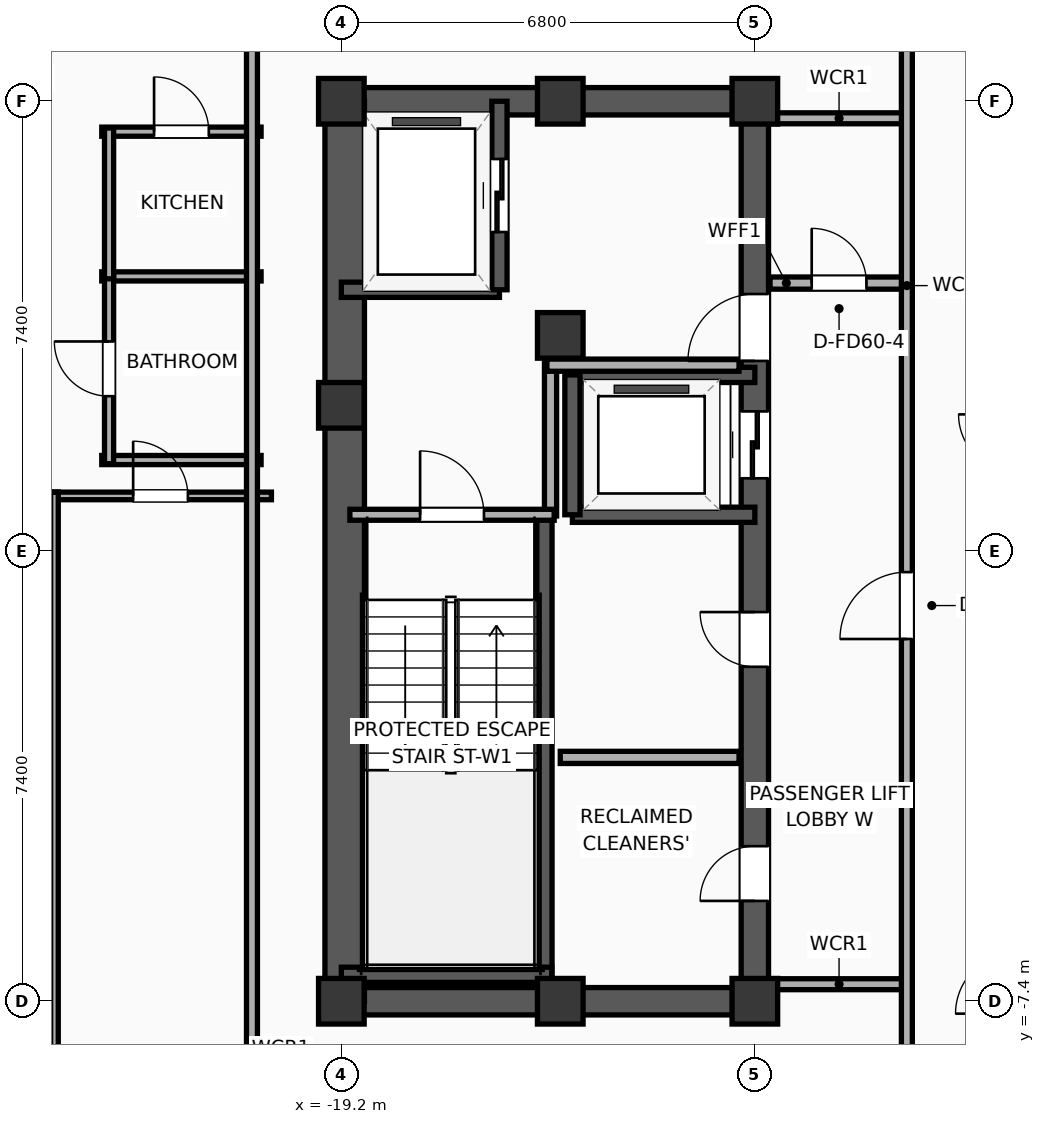
"""IFC4 building model, lengths in metres.
Left out: names, types, materials, properties, quantities, classifications, styles, units other than length and angle.
Written with IfcOpenShell. Run it as: python <this file> out.ifc"""

import sys

from ifc_helpers import new_model, si_unit, direction, frame, frame_2d, origin, origin_2d, place, context, subcontext, project, spatial, rectangle, extrude, element, fill, save


model = new_model("IFC4")
c1 = context("Model", 3, precision=1e-05, world=origin(), true_north=direction((0.0, 1.0)))
c2 = subcontext(c1, "Body", "Model", "MODEL_VIEW")
j1 = project(units=[si_unit("LENGTHUNIT", "METRE"), si_unit("PLANEANGLEUNIT", "RADIAN")], contexts=[c1])
p1 = place(None, origin())
s1 = spatial("IfcSite", under=j1, at=p1, CompositionType="ELEMENT")
p2 = place(p1, origin())
s2 = spatial("IfcBuilding", under=s1, at=p2, CompositionType="ELEMENT")
p3 = place(p2, frame((0.0, 0.0, 302.9)))
s3 = spatial("IfcBuildingStorey", under=s2, at=p3, CompositionType="ELEMENT", Elevation=302.9)
for number, where, z_axis, x_axis in (
    (1, (-19.2, -7.4, 0.0), (0.0, 0.0, 1.0), (1.0, 0.0, 0.0)),
    (2, (-19.2, 2.4, 0.0), (0.0, 0.0, 1.0), (1.0, 0.0, 0.0)),
    (3, (-19.2, 7.4, 0.0), (0.0, 0.0, 1.0), (1.0, 0.0, 0.0)),
    (4, (-15.6, -7.4, 0.0), (0.0, 0.0, 1.0), (1.0, 0.0, 0.0)),
    (5, (-15.6, 7.4, 0.0), (0.0, 0.0, 1.0), (1.0, 0.0, 0.0)),
    (6, (-12.4, -7.4, 0.0), (0.0, 0.0, 1.0), (1.0, 0.0, 0.0)),
    (7, (-15.6, 3.55, 0.0), (0.0, 0.0, 1.0), (1.0, 0.0, 0.0)),
    (8, (-12.4, 7.4, 0.0), (0.0, 0.0, 1.0), (1.0, 0.0, 0.0)),
):
    element("IfcColumn", number, at=place(p3, frame(where, z_axis=z_axis, x_axis=x_axis)), inside=s3, PredefinedType="COLUMN", context=c2, shape_type="SweptSolid", body=[
        extrude(rectangle(XDim=0.75, YDim=0.75, at=origin_2d()), origin(), (0.0, 0.0, 1.0), 3.9),
    ])
for number, where, z_axis, x_axis in (
    (9, (-19.425, -7.4, 0.0), (0.0, 0.0, 1.0), (1.0, 0.0, 0.0)),
    (10, (-19.425, 7.4, 0.0), (0.0, 0.0, 1.0), (1.0, 0.0, 0.0)),
):
    element("IfcWall", number, at=place(p3, frame(where, z_axis=z_axis, x_axis=x_axis)), inside=s3, PredefinedType="SHEAR", context=c2, shape_type="SweptSolid", body=[
        extrude(rectangle(XDim=7.25, YDim=0.45, at=frame_2d((3.625, 0.0))), origin(), (0.0, 0.0, 1.0), 3.635),
    ])
p4 = place(p3, frame((-19.145, -7.4, 0.0), z_axis=(0.0, 0.0, 1.0), x_axis=(0.0, 1.0, 0.0)))
e11 = element("IfcWall", 11, at=p4, inside=s3, PredefinedType="SHEAR", context=c2, shape_type="SweptSolid", body=[
    extrude(rectangle(XDim=14.8, YDim=0.65, at=frame_2d((7.4, 0.0))), origin(), (0.0, 0.0, 1.0), 3.635),
])
p5 = place(p3, frame((-12.4, -7.4, 0.0), z_axis=(0.0, 0.0, 1.0), x_axis=(0.0, 1.0, 0.0)))
e12 = element("IfcWall", 12, at=p5, inside=s3, PredefinedType="SHEAR", context=c2, shape_type="SweptSolid", body=[
    extrude(rectangle(XDim=14.8, YDim=0.45, at=frame_2d((7.4, 0.0))), origin(), (0.0, 0.0, 1.0), 3.635),
])
p6 = place(p5, frame((8.6, 0.0, 0.0)))
e13 = element("IfcOpeningElement", 13, at=p6, cuts=e12, PredefinedType="OPENING", context=c2, shape_type="SweptSolid", body=[
    extrude(rectangle(XDim=1.1, YDim=2.05, at=frame_2d((0.55, 1.025))), frame((0.0, 0.235, 0.0), z_axis=(0.0, -1.0, 0.0), x_axis=(1.0, 0.0, 0.0)), (0.0, 0.0, 1.0), 0.47),
])
p7 = place(p5, frame((10.53, 0.0, 0.0)))
e14 = element("IfcOpeningElement", 14, at=p7, cuts=e12, PredefinedType="OPENING", context=c2, shape_type="SweptSolid", body=[
    extrude(rectangle(XDim=1.1, YDim=2.05, at=frame_2d((0.55, 1.025))), frame((0.0, 0.235, 0.0), z_axis=(0.0, -1.0, 0.0), x_axis=(1.0, 0.0, 0.0)), (0.0, 0.0, 1.0), 0.47),
])
p8 = place(p5, frame((1.65, 0.0, 0.0)))
e15 = element("IfcOpeningElement", 15, at=p8, cuts=e12, PredefinedType="OPENING", context=c2, shape_type="SweptSolid", body=[
    extrude(rectangle(XDim=0.9, YDim=2.05, at=frame_2d((0.45, 1.025))), frame((0.0, 0.235, 0.0), z_axis=(0.0, -1.0, 0.0), x_axis=(1.0, 0.0, 0.0)), (0.0, 0.0, 1.0), 0.47),
])
p9 = place(p5, frame((5.5, 0.0, 0.0)))
e16 = element("IfcOpeningElement", 16, at=p9, cuts=e12, PredefinedType="OPENING", context=c2, shape_type="SweptSolid", body=[
    extrude(rectangle(XDim=0.9, YDim=2.05, at=frame_2d((0.45, 1.025))), frame((0.0, 0.235, 0.0), z_axis=(0.0, -1.0, 0.0), x_axis=(1.0, 0.0, 0.0)), (0.0, 0.0, 1.0), 0.47),
])
p10 = place(p3, frame((-15.86, -7.085, 0.0), z_axis=(0.0, 0.0, 1.0), x_axis=(0.0, 1.0, 0.0)))
e17 = element("IfcWall", 17, at=p10, inside=s3, PredefinedType="SOLIDWALL", context=c2, shape_type="SweptSolid", body=[
    extrude(rectangle(XDim=7.685, YDim=0.25, at=frame_2d((3.843, 0.0))), origin(), (0.0, 0.0, 1.0), 3.635),
])
p11 = place(p3, frame((-19.2, -6.965, 0.0), z_axis=(0.0, 0.0, 1.0), x_axis=(1.0, 0.0, 0.0)))
e18 = element("IfcWall", 18, at=p11, inside=s3, PredefinedType="SOLIDWALL", context=c2, shape_type="SweptSolid", body=[
    extrude(rectangle(XDim=3.46, YDim=0.25, at=frame_2d((1.73, 0.0))), origin(), (0.0, 0.0, 1.0), 3.635),
])
p12 = place(p3, frame((-19.2, 4.3, 0.0), z_axis=(0.0, 0.0, 1.0), x_axis=(1.0, 0.0, 0.0)))
e19 = element("IfcWall", 19, at=p12, inside=s3, PredefinedType="SOLIDWALL", context=c2, shape_type="SweptSolid", body=[
    extrude(rectangle(XDim=2.6, YDim=0.25, at=frame_2d((1.3, 0.0))), origin(), (0.0, 0.0, 1.0), 3.635),
])
p13 = place(p3, frame((-16.6, 4.3, 0.0), z_axis=(0.0, 0.0, 1.0), x_axis=(0.0, 1.0, 0.0)))
e20 = element("IfcWall", 20, at=p13, inside=s3, PredefinedType="SOLIDWALL", context=c2, shape_type="SweptSolid", body=[
    extrude(rectangle(XDim=3.1, YDim=0.25, at=frame_2d((1.55, 0.0))), origin(), (0.0, 0.0, 1.0), 3.635),
])
p14 = place(p13, frame((0.95, 0.0, 0.0)))
e21 = element("IfcOpeningElement", 21, at=p14, cuts=e20, PredefinedType="OPENING", context=c2, shape_type="SweptSolid", body=[
    extrude(rectangle(XDim=1.2, YDim=2.05, at=frame_2d((0.6, 1.025))), frame((0.0, 0.135, 0.0), z_axis=(0.0, -1.0, 0.0), x_axis=(1.0, 0.0, 0.0)), (0.0, 0.0, 1.0), 0.27),
])
for number, where, z_axis, x_axis in (
    (22, (-15.4, 0.6, 0.0), (0.0, 0.0, 1.0), (1.0, 0.0, 0.0)),
    (23, (-12.4, 2.9, 0.0), (0.0, 0.0, 1.0), (-1.0, 0.0, 0.0)),
):
    element("IfcWall", number, at=place(p3, frame(where, z_axis=z_axis, x_axis=x_axis)), inside=s3, PredefinedType="SOLIDWALL", context=c2, shape_type="SweptSolid", body=[
        extrude(rectangle(XDim=3.0, YDim=0.25, at=frame_2d((1.5, 0.0))), origin(), (0.0, 0.0, 1.0), 3.635),
    ])
p15 = place(p3, frame((-15.4, 2.9, 0.0), z_axis=(0.0, 0.0, 1.0), x_axis=(0.0, -1.0, 0.0)))
e24 = element("IfcWall", 24, at=p15, inside=s3, PredefinedType="SOLIDWALL", context=c2, shape_type="SweptSolid", body=[
    extrude(rectangle(XDim=2.3, YDim=0.25, at=frame_2d((1.15, 0.0))), origin(), (0.0, 0.0, 1.0), 3.635),
])
p16 = place(p3, frame((-15.76, 0.58, 0.0), z_axis=(0.0, 0.0, 1.0), x_axis=(0.0, 1.0, 0.0)))
e25 = element("IfcWall", 25, at=p16, inside=s3, PredefinedType="PARTITIONING", context=c2, shape_type="SweptSolid", body=[
    extrude(rectangle(XDim=2.52, YDim=0.2, at=frame_2d((1.26, 0.0))), origin(), (0.0, 0.0, 1.0), 3.635),
])
p17 = place(p3, frame((-15.82, 3.06, 0.0), z_axis=(0.0, 0.0, 1.0), x_axis=(1.0, 0.0, 0.0)))
e26 = element("IfcWall", 26, at=p17, inside=s3, PredefinedType="PARTITIONING", context=c2, shape_type="SweptSolid", body=[
    extrude(rectangle(XDim=3.16, YDim=0.2, at=frame_2d((1.58, 0.0))), origin(), (0.0, 0.0, 1.0), 3.635),
])
p18 = place(p3, frame((-19.06, 0.6, 0.0), z_axis=(0.0, 0.0, 1.0), x_axis=(1.0, 0.0, 0.0)))
e27 = element("IfcWall", 27, at=p18, inside=s3, PredefinedType="PARTITIONING", context=c2, shape_type="SweptSolid", body=[
    extrude(rectangle(XDim=3.36, YDim=0.18, at=frame_2d((1.68, 0.0))), origin(), (0.0, 0.0, 1.0), 3.635),
])
p19 = place(p18, frame((1.155, 0.0, 0.0)))
e28 = element("IfcOpeningElement", 28, at=p19, cuts=e27, PredefinedType="OPENING", context=c2, shape_type="SweptSolid", body=[
    extrude(rectangle(XDim=1.05, YDim=2.05, at=frame_2d((0.525, 1.025))), frame((0.0, 0.1, 0.0), z_axis=(0.0, -1.0, 0.0), x_axis=(1.0, 0.0, 0.0)), (0.0, 0.0, 1.0), 0.2),
])
p20 = place(p3, frame((-15.6, -3.39, 0.0), z_axis=(0.0, 0.0, 1.0), x_axis=(1.0, 0.0, 0.0)))
e29 = element("IfcWall", 29, at=p20, inside=s3, PredefinedType="PARTITIONING", context=c2, shape_type="SweptSolid", body=[
    extrude(rectangle(XDim=2.94, YDim=0.2, at=frame_2d((1.47, 0.0))), origin(), (0.0, 0.0, 1.0), 3.635),
])
p21 = place(p3, frame((-12.15, 4.41, 0.0), z_axis=(0.0, 0.0, 1.0), x_axis=(1.0, 0.0, 0.0)))
e30 = element("IfcWall", 30, at=p21, inside=s3, PredefinedType="PARTITIONING", context=c2, shape_type="SweptSolid", body=[
    extrude(rectangle(XDim=2.27, YDim=0.2, at=frame_2d((1.135, 0.0))), origin(), (0.0, 0.0, 1.0), 3.635),
])
p22 = place(p21, frame((0.685, 0.0, 0.0)))
e31 = element("IfcOpeningElement", 31, at=p22, cuts=e30, PredefinedType="OPENING", context=c2, shape_type="SweptSolid", body=[
    extrude(rectangle(XDim=0.9, YDim=2.05, at=frame_2d((0.45, 1.025))), frame((0.0, 0.11, 0.0), z_axis=(0.0, -1.0, 0.0), x_axis=(1.0, 0.0, 0.0)), (0.0, 0.0, 1.0), 0.22),
])
for number, where, z_axis, x_axis in (
    (32, (-12.15, 7.12, 0.0), (0.0, 0.0, 1.0), (1.0, 0.0, 0.0)),
    (33, (-12.15, -7.12, 0.0), (0.0, 0.0, 1.0), (1.0, 0.0, 0.0)),
):
    element("IfcWall", number, at=place(p3, frame(where, z_axis=z_axis, x_axis=x_axis)), inside=s3, PredefinedType="PARTITIONING", context=c2, shape_type="SweptSolid", body=[
        extrude(rectangle(XDim=2.27, YDim=0.18, at=frame_2d((1.135, 0.0))), origin(), (0.0, 0.0, 1.0), 3.635),
    ])
p23 = place(p3, frame((-9.9, -8.93, 0.0), z_axis=(0.0, 0.0, 1.0), x_axis=(0.0, 1.0, 0.0)))
e34 = element("IfcWall", 34, at=p23, inside=s3, PredefinedType="PARTITIONING", context=c2, shape_type="SweptSolid", body=[
    extrude(rectangle(XDim=17.86, YDim=0.18, at=frame_2d((8.93, 0.0))), origin(), (0.0, 0.0, 1.0), 3.635),
])
p24 = place(p23, frame((7.487, 0.0, 0.0)))
e35 = element("IfcOpeningElement", 35, at=p24, cuts=e34, PredefinedType="OPENING", context=c2, shape_type="SweptSolid", body=[
    extrude(rectangle(XDim=1.1, YDim=2.05, at=frame_2d((0.55, 1.025))), frame((0.0, 0.1, 0.0), z_axis=(0.0, -1.0, 0.0), x_axis=(1.0, 0.0, 0.0)), (0.0, 0.0, 1.0), 0.2),
])
p25 = place(p3, frame((-23.14, 6.9, 0.0), z_axis=(0.0, 0.0, 1.0), x_axis=(1.0, 0.0, 0.0)))
e36 = element("IfcWall", 36, at=p25, inside=s3, PredefinedType="PLUMBINGWALL", context=c2, shape_type="SweptSolid", body=[
    extrude(rectangle(XDim=2.62, YDim=0.15, at=frame_2d((1.31, 0.0))), origin(), (0.0, 0.0, 1.0), 3.635),
])
p26 = place(p25, frame((0.86, 0.0, 0.0)))
e37 = element("IfcOpeningElement", 37, at=p26, cuts=e36, PredefinedType="OPENING", context=c2, shape_type="SweptSolid", body=[
    extrude(rectangle(XDim=0.9, YDim=2.05, at=frame_2d((0.45, 1.025))), frame((0.0, 0.085, 0.0), z_axis=(0.0, -1.0, 0.0), x_axis=(1.0, 0.0, 0.0)), (0.0, 0.0, 1.0), 0.17),
])
for number, where, z_axis, x_axis in (
    (38, (-23.14, 4.52, 0.0), (0.0, 0.0, 1.0), (1.0, 0.0, 0.0)),
    (39, (-23.14, 1.5, 0.0), (0.0, 0.0, 1.0), (1.0, 0.0, 0.0)),
):
    element("IfcWall", number, at=place(p3, frame(where, z_axis=z_axis, x_axis=x_axis)), inside=s3, PredefinedType="PLUMBINGWALL", context=c2, shape_type="SweptSolid", body=[
        extrude(rectangle(XDim=2.62, YDim=0.15, at=frame_2d((1.31, 0.0))), origin(), (0.0, 0.0, 1.0), 3.635),
    ])
p27 = place(p3, frame((-23.02, 1.44, 0.0), z_axis=(0.0, 0.0, 1.0), x_axis=(0.0, 1.0, 0.0)))
e40 = element("IfcWall", 40, at=p27, inside=s3, PredefinedType="PLUMBINGWALL", context=c2, shape_type="SweptSolid", body=[
    extrude(rectangle(XDim=3.12, YDim=0.15, at=frame_2d((1.56, 0.0))), origin(), (0.0, 0.0, 1.0), 3.635),
])
p28 = place(p27, frame((1.11, 0.0, 0.0)))
e41 = element("IfcOpeningElement", 41, at=p28, cuts=e40, PredefinedType="OPENING", context=c2, shape_type="SweptSolid", body=[
    extrude(rectangle(XDim=0.9, YDim=2.05, at=frame_2d((0.45, 1.025))), frame((0.0, 0.085, 0.0), z_axis=(0.0, -1.0, 0.0), x_axis=(1.0, 0.0, 0.0)), (0.0, 0.0, 1.0), 0.17),
])
p29 = place(p3, frame((-23.02, 4.48, 0.0), z_axis=(0.0, 0.0, 1.0), x_axis=(0.0, 1.0, 0.0)))
e42 = element("IfcWall", 42, at=p29, inside=s3, PredefinedType="PLUMBINGWALL", context=c2, shape_type="SweptSolid", body=[
    extrude(rectangle(XDim=2.48, YDim=0.15, at=frame_2d((1.24, 0.0))), origin(), (0.0, 0.0, 1.0), 3.635),
])
p30 = place(p3, frame((-27.229, 0.91, 0.0), z_axis=(0.0, 0.0, 1.0), x_axis=(1.0, 0.0, 0.0)))
e43 = element("IfcWall", 43, at=p30, inside=s3, PredefinedType="PARTITIONING", context=c2, shape_type="SweptSolid", body=[
    extrude(rectangle(XDim=3.374, YDim=0.125, at=frame_2d((1.687, 0.0))), origin(), (0.0, 0.0, 1.0), 3.635),
])
p31 = place(p30, frame((1.237, 0.0, 0.0)))
e44 = element("IfcOpeningElement", 44, at=p31, cuts=e43, PredefinedType="OPENING", context=c2, shape_type="SweptSolid", body=[
    extrude(rectangle(XDim=0.9, YDim=2.05, at=frame_2d((0.45, 1.025))), frame((0.0, 0.073, 0.0), z_axis=(0.0, -1.0, 0.0), x_axis=(1.0, 0.0, 0.0)), (0.0, 0.0, 1.0), 0.145),
])
p32 = place(p3, frame((-23.98, 0.91, 0.0), z_axis=(0.0, 0.0, 1.0), x_axis=(1.0, 0.0, 0.0)))
e45 = element("IfcWall", 45, at=p32, inside=s3, PredefinedType="PARTITIONING", context=c2, shape_type="SweptSolid", body=[
    extrude(rectangle(XDim=3.63, YDim=0.125, at=frame_2d((1.815, 0.0))), origin(), (0.0, 0.0, 1.0), 3.635),
])
p33 = place(p32, frame((1.356, 0.0, 0.0)))
e46 = element("IfcOpeningElement", 46, at=p33, cuts=e45, PredefinedType="OPENING", context=c2, shape_type="SweptSolid", body=[
    extrude(rectangle(XDim=0.9, YDim=2.05, at=frame_2d((0.45, 1.025))), frame((0.0, 0.073, 0.0), z_axis=(0.0, -1.0, 0.0), x_axis=(1.0, 0.0, 0.0)), (0.0, 0.0, 1.0), 0.145),
])
p34 = place(p3, frame((-23.918, -9.16, 0.0), z_axis=(0.0, 0.0, 1.0), x_axis=(0.0, 1.0, 0.0)))
e47 = element("IfcWall", 47, at=p34, inside=s3, PredefinedType="PARTITIONING", context=c2, shape_type="SweptSolid", body=[
    extrude(rectangle(XDim=10.13, YDim=0.125, at=frame_2d((5.065, 0.0))), origin(), (0.0, 0.0, 1.0), 3.635),
])
p35 = place(p3, frame((-20.67, -8.96, 0.0), z_axis=(0.0, 0.0, 1.0), x_axis=(0.0, 1.0, 0.0)))
e48 = element("IfcWall", 48, at=p35, inside=s3, PredefinedType="PARTITIONING", context=c2, shape_type="SweptSolid", body=[
    extrude(rectangle(XDim=17.92, YDim=0.18, at=frame_2d((8.96, 0.0))), origin(), (0.0, 0.0, 1.0), 3.635),
])
p36 = place(p14, origin())
e49 = element("IfcDoor", 49, at=p36, inside=s3, OperationType="SLIDING_TO_LEFT", PredefinedType="DOOR", context=c2, shape_type="SweptSolid", body=[
    extrude(rectangle(XDim=1.2, YDim=2.05, at=frame_2d((0.6, 1.025))), frame((0.0, 0.025, 0.0), z_axis=(0.0, -1.0, 0.0), x_axis=(1.0, 0.0, 0.0)), (0.0, 0.0, 1.0), 0.05),
])
fill(e21, e49)
p37 = place(p6, origin())
e50 = element("IfcDoor", 50, at=p37, inside=s3, OperationType="SLIDING_TO_LEFT", PredefinedType="DOOR", context=c2, shape_type="SweptSolid", body=[
    extrude(rectangle(XDim=1.1, YDim=2.05, at=frame_2d((0.55, 1.025))), frame((0.0, 0.025, 0.0), z_axis=(0.0, -1.0, 0.0), x_axis=(1.0, 0.0, 0.0)), (0.0, 0.0, 1.0), 0.05),
])
fill(e13, e50)
p38 = place(p19, origin())
e51 = element("IfcDoor", 51, at=p38, inside=s3, OperationType="SINGLE_SWING_LEFT", PredefinedType="DOOR", context=c2, shape_type="SweptSolid", body=[
    extrude(rectangle(XDim=1.05, YDim=2.05, at=frame_2d((0.525, 1.025))), frame((0.0, 0.025, 0.0), z_axis=(0.0, -1.0, 0.0), x_axis=(1.0, 0.0, 0.0)), (0.0, 0.0, 1.0), 0.05),
])
fill(e28, e51)
p39 = place(p22, origin())
e52 = element("IfcDoor", 52, at=p39, inside=s3, OperationType="SINGLE_SWING_LEFT", PredefinedType="DOOR", context=c2, shape_type="SweptSolid", body=[
    extrude(rectangle(XDim=0.9, YDim=2.05, at=frame_2d((0.45, 1.025))), frame((0.0, 0.025, 0.0), z_axis=(0.0, -1.0, 0.0), x_axis=(1.0, 0.0, 0.0)), (0.0, 0.0, 1.0), 0.05),
])
fill(e31, e52)
p40 = place(p24, origin())
e53 = element("IfcDoor", 53, at=p40, inside=s3, OperationType="SINGLE_SWING_LEFT", PredefinedType="DOOR", context=c2, shape_type="SweptSolid", body=[
    extrude(rectangle(XDim=1.1, YDim=2.05, at=frame_2d((0.55, 1.025))), frame((0.0, 0.025, 0.0), z_axis=(0.0, -1.0, 0.0), x_axis=(1.0, 0.0, 0.0)), (0.0, 0.0, 1.0), 0.05),
])
fill(e35, e53)
p41 = place(p26, origin())
e54 = element("IfcDoor", 54, at=p41, inside=s3, OperationType="SINGLE_SWING_LEFT", PredefinedType="DOOR", context=c2, shape_type="SweptSolid", body=[
    extrude(rectangle(XDim=0.9, YDim=2.05, at=frame_2d((0.45, 1.025))), frame((0.0, 0.025, 0.0), z_axis=(0.0, -1.0, 0.0), x_axis=(1.0, 0.0, 0.0)), (0.0, 0.0, 1.0), 0.05),
])
fill(e37, e54)
p42 = place(p28, origin())
e55 = element("IfcDoor", 55, at=p42, inside=s3, OperationType="SINGLE_SWING_RIGHT", PredefinedType="DOOR", context=c2, shape_type="SweptSolid", body=[
    extrude(rectangle(XDim=0.9, YDim=2.05, at=frame_2d((0.45, 1.025))), frame((0.0, 0.025, 0.0), z_axis=(0.0, -1.0, 0.0), x_axis=(1.0, 0.0, 0.0)), (0.0, 0.0, 1.0), 0.05),
])
fill(e41, e55)
p43 = place(p33, origin())
e56 = element("IfcDoor", 56, at=p43, inside=s3, OperationType="SINGLE_SWING_LEFT", PredefinedType="DOOR", context=c2, shape_type="SweptSolid", body=[
    extrude(rectangle(XDim=0.9, YDim=2.05, at=frame_2d((0.45, 1.025))), frame((0.0, 0.025, 0.0), z_axis=(0.0, -1.0, 0.0), x_axis=(1.0, 0.0, 0.0)), (0.0, 0.0, 1.0), 0.05),
])
fill(e46, e56)
p44 = place(p7, origin())
e57 = element("IfcDoor", 57, at=p44, inside=s3, OperationType="SINGLE_SWING_LEFT", PredefinedType="DOOR", context=c2, shape_type="SweptSolid", body=[
    extrude(rectangle(XDim=1.1, YDim=2.05, at=frame_2d((0.55, 1.025))), frame((0.0, 0.025, 0.0), z_axis=(0.0, -1.0, 0.0), x_axis=(1.0, 0.0, 0.0)), (0.0, 0.0, 1.0), 0.05),
])
fill(e14, e57)
p45 = place(p8, origin())
e58 = element("IfcDoor", 58, at=p45, inside=s3, OperationType="SINGLE_SWING_LEFT", PredefinedType="DOOR", context=c2, shape_type="SweptSolid", body=[
    extrude(rectangle(XDim=0.9, YDim=2.05, at=frame_2d((0.45, 1.025))), frame((0.0, 0.025, 0.0), z_axis=(0.0, -1.0, 0.0), x_axis=(1.0, 0.0, 0.0)), (0.0, 0.0, 1.0), 0.05),
])
fill(e15, e58)
p46 = place(p9, origin())
e59 = element("IfcDoor", 59, at=p46, inside=s3, OperationType="SINGLE_SWING_RIGHT", PredefinedType="DOOR", context=c2, shape_type="SweptSolid", body=[
    extrude(rectangle(XDim=0.9, YDim=2.05, at=frame_2d((0.45, 1.025))), frame((0.0, 0.025, 0.0), z_axis=(0.0, -1.0, 0.0), x_axis=(1.0, 0.0, 0.0)), (0.0, 0.0, 1.0), 0.05),
])
fill(e16, e59)
save(model, sys.argv[1])
